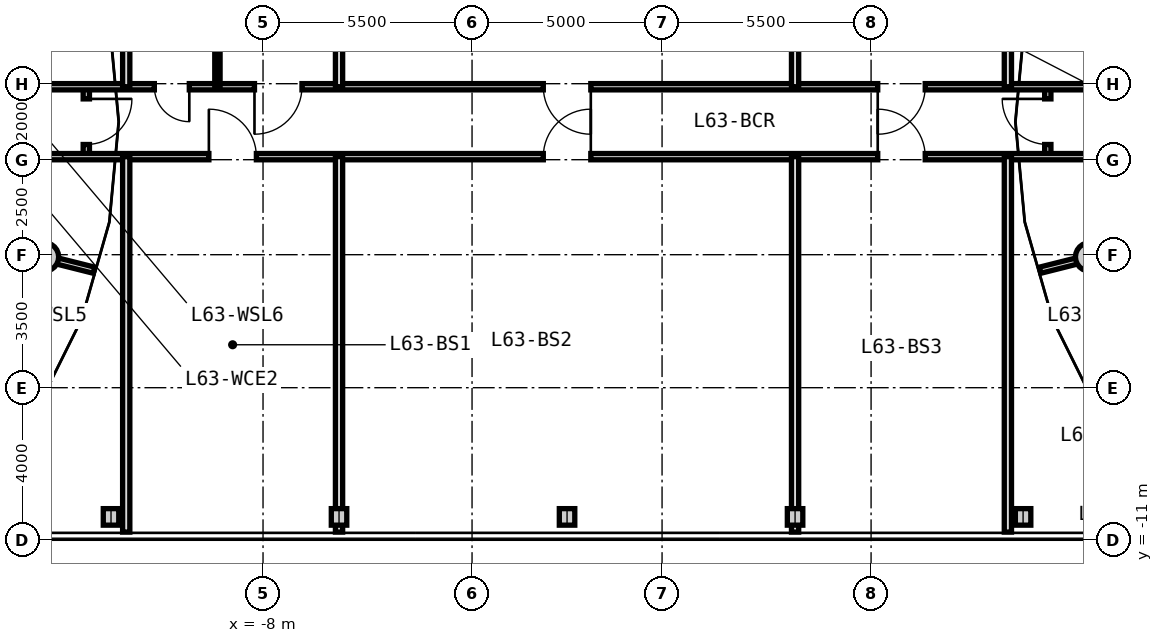
"""IFC4 building model, lengths in metres.
Left out: names, types, materials, properties, quantities, classifications, styles, units other than length and angle.
Written with IfcOpenShell. Run it as: python <this file> out.ifc"""

import sys

from ifc_helpers import new_model, si_unit, direction, frame, frame_2d, origin, origin_2d, place, context, subcontext, project, spatial, rectangle, circle, i_section, extrude, source, transform, mapped, element, fill, save


model = new_model("IFC4")
c1 = context("Model", 3, precision=1e-05, world=origin(), true_north=direction((0.0, 1.0)))
c2 = subcontext(c1, "Body", "Model", "MODEL_VIEW")
j1 = project(units=[si_unit("LENGTHUNIT", "METRE"), si_unit("PLANEANGLEUNIT", "RADIAN")], contexts=[c1])
p1 = place(None, origin())
s1 = spatial("IfcSite", under=j1, at=p1, CompositionType="ELEMENT")
p2 = place(p1, origin())
s2 = spatial("IfcBuilding", under=s1, at=p2, CompositionType="ELEMENT")
p3 = place(p2, frame((0.0, 0.0, 203.8)))
s3 = spatial("IfcBuildingStorey", under=s2, at=p3, CompositionType="ELEMENT", Elevation=203.8)
m1 = source(origin(), c2, "Body", "SweptSolid", [
    extrude(circle(Radius=0.375, at=origin_2d()), origin(), (0.0, 0.0, 1.0), 4.0),
])
for number, where, z_axis, x_axis in (
    (1, (-13.753, -3.559, 0.0), (0.0, 0.0, 1.0), (1.0, 0.0, 0.0)),
    (2, (13.753, -3.559, 0.0), (0.0, 0.0, 1.0), (1.0, 0.0, 0.0)),
):
    element("IfcColumn", number, at=place(p3, frame(where, z_axis=z_axis, x_axis=x_axis)), inside=s3, PredefinedType="COLUMN", context=c2, shape_type="MappedRepresentation", body=[
        mapped(m1, transform((0.0, 0.0, 0.0), x_axis=(1.0, 0.0, 0.0), y_axis=(0.0, 1.0, 0.0), z_axis=(0.0, 0.0, 1.0), scale=1.0)),
    ])
m2 = source(origin(), c2, "Body", "SweptSolid", [
    extrude(i_section(OverallWidth=0.407, OverallDepth=0.435, WebThickness=0.024, FlangeThickness=0.039, FilletRadius=0.015, at=origin_2d()), origin(), (0.0, 0.0, 1.0), 4.0),
])
for number, where, z_axis, x_axis in (
    (3, (-12.0, -10.4, 0.0), (0.0, 0.0, 1.0), (1.0, 0.0, 0.0)),
    (4, (-6.0, -10.4, 0.0), (0.0, 0.0, 1.0), (1.0, 0.0, 0.0)),
    (5, (0.0, -10.4, 0.0), (0.0, 0.0, 1.0), (1.0, 0.0, 0.0)),
    (6, (6.0, -10.4, 0.0), (0.0, 0.0, 1.0), (1.0, 0.0, 0.0)),
    (7, (12.0, -10.4, 0.0), (0.0, 0.0, 1.0), (1.0, 0.0, 0.0)),
):
    element("IfcColumn", number, at=place(p3, frame(where, z_axis=z_axis, x_axis=x_axis)), inside=s3, PredefinedType="COLUMN", context=c2, shape_type="MappedRepresentation", body=[
        mapped(m2, transform((0.0, 0.0, 0.0), x_axis=(1.0, 0.0, 0.0), y_axis=(0.0, 1.0, 0.0), z_axis=(0.0, 0.0, 1.0), scale=1.0)),
    ])
m3 = source(origin(), c2, "Body", "SweptSolid", [
    extrude(rectangle(XDim=6.157, YDim=0.165, at=frame_2d((3.079, 0.0))), origin(), (0.0, 0.0, 1.0), 3.295),
])
for number, where, z_axis, x_axis in (
    (8, (-18.42, -2.407, 0.0), (0.0, 0.0, 1.0), (0.97, -0.244, 0.0)),
    (9, (18.42, -2.407, 0.0), (0.0, 0.0, 1.0), (-0.97, -0.244, 0.0)),
):
    element("IfcWall", number, at=place(p3, frame(where, z_axis=z_axis, x_axis=x_axis)), inside=s3, PredefinedType="PARTITIONING", context=c2, shape_type="MappedRepresentation", body=[
        mapped(m3, transform((0.0, 0.0, 0.0), x_axis=(1.0, 0.0, 0.0), y_axis=(0.0, 1.0, 0.0), z_axis=(0.0, 0.0, 1.0), scale=1.0)),
    ])
m4 = source(origin(), c2, "Body", "SweptSolid", [
    extrude(rectangle(XDim=1.84, YDim=0.165, at=frame_2d((0.92, 0.0))), origin(), (0.0, 0.0, 1.0), 3.695),
])
p4 = place(p3, frame((-12.65, -0.92, 0.0), z_axis=(0.0, 0.0, 1.0), x_axis=(0.0, 1.0, 0.0)))
e10 = element("IfcWall", 10, at=p4, inside=s3, PredefinedType="PARTITIONING", context=c2, shape_type="MappedRepresentation", body=[
    mapped(m4, transform((0.0, 0.0, 0.0), x_axis=(1.0, 0.0, 0.0), y_axis=(0.0, 1.0, 0.0), z_axis=(0.0, 0.0, 1.0), scale=1.0)),
])
p5 = place(p4, frame((0.32, 0.0, 0.0)))
e11 = element("IfcOpeningElement", 11, at=p5, cuts=e10, PredefinedType="OPENING", context=c2, shape_type="SweptSolid", body=[
    extrude(rectangle(XDim=1.2, YDim=2.15, at=frame_2d((0.6, 1.075))), frame((0.0, 0.093, 0.0), z_axis=(0.0, -1.0, 0.0), x_axis=(1.0, 0.0, 0.0)), (0.0, 0.0, 1.0), 0.185),
])
p6 = place(p3, frame((12.65, -0.92, 0.0), z_axis=(0.0, 0.0, 1.0), x_axis=(0.0, 1.0, 0.0)))
e12 = element("IfcWall", 12, at=p6, inside=s3, PredefinedType="PARTITIONING", context=c2, shape_type="MappedRepresentation", body=[
    mapped(m4, transform((0.0, 0.0, 0.0), x_axis=(1.0, 0.0, 0.0), y_axis=(0.0, 1.0, 0.0), z_axis=(0.0, 0.0, 1.0), scale=1.0)),
])
p7 = place(p6, frame((0.32, 0.0, 0.0)))
e13 = element("IfcOpeningElement", 13, at=p7, cuts=e12, PredefinedType="OPENING", context=c2, shape_type="SweptSolid", body=[
    extrude(rectangle(XDim=1.2, YDim=2.15, at=frame_2d((0.6, 1.075))), frame((0.0, 0.093, 0.0), z_axis=(0.0, -1.0, 0.0), x_axis=(1.0, 0.0, 0.0)), (0.0, 0.0, 1.0), 0.185),
])
m5 = source(origin(), c2, "Body", "SweptSolid", [
    extrude(rectangle(XDim=37.0, YDim=0.165, at=frame_2d((18.5, 0.0))), origin(), (0.0, 0.0, 1.0), 3.695),
])
p8 = place(p3, frame((-18.5, -0.92, 0.0), z_axis=(0.0, 0.0, 1.0), x_axis=(1.0, 0.0, 0.0)))
e14 = element("IfcWall", 14, at=p8, inside=s3, PredefinedType="PARTITIONING", context=c2, shape_type="MappedRepresentation", body=[
    mapped(m5, transform((0.0, 0.0, 0.0), x_axis=(1.0, 0.0, 0.0), y_axis=(0.0, 1.0, 0.0), z_axis=(0.0, 0.0, 1.0), scale=1.0)),
])
p9 = place(p8, frame((2.662, 0.0, 0.0)))
e15 = element("IfcOpeningElement", 15, at=p9, cuts=e14, PredefinedType="OPENING", context=c2, shape_type="SweptSolid", body=[
    extrude(rectangle(XDim=0.95, YDim=2.1, at=frame_2d((0.475, 1.05))), frame((0.0, 0.093, 0.0), z_axis=(0.0, -1.0, 0.0), x_axis=(1.0, 0.0, 0.0)), (0.0, 0.0, 1.0), 0.185),
])
p10 = place(p8, frame((33.388, 0.0, 0.0)))
e16 = element("IfcOpeningElement", 16, at=p10, cuts=e14, PredefinedType="OPENING", context=c2, shape_type="SweptSolid", body=[
    extrude(rectangle(XDim=0.95, YDim=2.1, at=frame_2d((0.475, 1.05))), frame((0.0, 0.093, 0.0), z_axis=(0.0, -1.0, 0.0), x_axis=(1.0, 0.0, 0.0)), (0.0, 0.0, 1.0), 0.185),
])
p11 = place(p8, frame((9.075, 0.0, 0.0)))
e17 = element("IfcOpeningElement", 17, at=p11, cuts=e14, PredefinedType="OPENING", context=c2, shape_type="SweptSolid", body=[
    extrude(rectangle(XDim=1.25, YDim=2.2, at=frame_2d((0.625, 1.1))), frame((0.0, 0.093, 0.0), z_axis=(0.0, -1.0, 0.0), x_axis=(1.0, 0.0, 0.0)), (0.0, 0.0, 1.0), 0.185),
])
p12 = place(p8, frame((17.875, 0.0, 0.0)))
e18 = element("IfcOpeningElement", 18, at=p12, cuts=e14, PredefinedType="OPENING", context=c2, shape_type="SweptSolid", body=[
    extrude(rectangle(XDim=1.25, YDim=2.2, at=frame_2d((0.625, 1.1))), frame((0.0, 0.093, 0.0), z_axis=(0.0, -1.0, 0.0), x_axis=(1.0, 0.0, 0.0)), (0.0, 0.0, 1.0), 0.185),
])
p13 = place(p8, frame((26.675, 0.0, 0.0)))
e19 = element("IfcOpeningElement", 19, at=p13, cuts=e14, PredefinedType="OPENING", context=c2, shape_type="SweptSolid", body=[
    extrude(rectangle(XDim=1.25, YDim=2.2, at=frame_2d((0.625, 1.1))), frame((0.0, 0.093, 0.0), z_axis=(0.0, -1.0, 0.0), x_axis=(1.0, 0.0, 0.0)), (0.0, 0.0, 1.0), 0.185),
])
p14 = place(p3, frame((-18.5, 0.92, 0.0), z_axis=(0.0, 0.0, 1.0), x_axis=(1.0, 0.0, 0.0)))
e20 = element("IfcWall", 20, at=p14, inside=s3, PredefinedType="PARTITIONING", context=c2, shape_type="MappedRepresentation", body=[
    mapped(m5, transform((0.0, 0.0, 0.0), x_axis=(1.0, 0.0, 0.0), y_axis=(0.0, 1.0, 0.0), z_axis=(0.0, 0.0, 1.0), scale=1.0)),
])
p15 = place(p14, frame((2.662, 0.0, 0.0)))
e21 = element("IfcOpeningElement", 21, at=p15, cuts=e20, PredefinedType="OPENING", context=c2, shape_type="SweptSolid", body=[
    extrude(rectangle(XDim=0.95, YDim=2.1, at=frame_2d((0.475, 1.05))), frame((0.0, 0.093, 0.0), z_axis=(0.0, -1.0, 0.0), x_axis=(1.0, 0.0, 0.0)), (0.0, 0.0, 1.0), 0.185),
])
p16 = place(p14, frame((33.388, 0.0, 0.0)))
e22 = element("IfcOpeningElement", 22, at=p16, cuts=e20, PredefinedType="OPENING", context=c2, shape_type="SweptSolid", body=[
    extrude(rectangle(XDim=0.95, YDim=2.1, at=frame_2d((0.475, 1.05))), frame((0.0, 0.093, 0.0), z_axis=(0.0, -1.0, 0.0), x_axis=(1.0, 0.0, 0.0)), (0.0, 0.0, 1.0), 0.185),
])
p17 = place(p14, frame((7.64, 0.0, 0.0)))
e23 = element("IfcOpeningElement", 23, at=p17, cuts=e20, PredefinedType="OPENING", context=c2, shape_type="SweptSolid", body=[
    extrude(rectangle(XDim=0.92, YDim=2.1, at=frame_2d((0.46, 1.05))), frame((0.0, 0.093, 0.0), z_axis=(0.0, -1.0, 0.0), x_axis=(1.0, 0.0, 0.0)), (0.0, 0.0, 1.0), 0.185),
])
p18 = place(p14, frame((10.275, 0.0, 0.0)))
e24 = element("IfcOpeningElement", 24, at=p18, cuts=e20, PredefinedType="OPENING", context=c2, shape_type="SweptSolid", body=[
    extrude(rectangle(XDim=1.25, YDim=2.2, at=frame_2d((0.625, 1.1))), frame((0.0, 0.093, 0.0), z_axis=(0.0, -1.0, 0.0), x_axis=(1.0, 0.0, 0.0)), (0.0, 0.0, 1.0), 0.185),
])
p19 = place(p14, frame((17.875, 0.0, 0.0)))
e25 = element("IfcOpeningElement", 25, at=p19, cuts=e20, PredefinedType="OPENING", context=c2, shape_type="SweptSolid", body=[
    extrude(rectangle(XDim=1.25, YDim=2.2, at=frame_2d((0.625, 1.1))), frame((0.0, 0.093, 0.0), z_axis=(0.0, -1.0, 0.0), x_axis=(1.0, 0.0, 0.0)), (0.0, 0.0, 1.0), 0.185),
])
p20 = place(p14, frame((26.675, 0.0, 0.0)))
e26 = element("IfcOpeningElement", 26, at=p20, cuts=e20, PredefinedType="OPENING", context=c2, shape_type="SweptSolid", body=[
    extrude(rectangle(XDim=1.25, YDim=2.2, at=frame_2d((0.625, 1.1))), frame((0.0, 0.093, 0.0), z_axis=(0.0, -1.0, 0.0), x_axis=(1.0, 0.0, 0.0)), (0.0, 0.0, 1.0), 0.185),
])
m6 = source(origin(), c2, "Body", "SweptSolid", [
    extrude(rectangle(XDim=9.88, YDim=0.19, at=frame_2d((4.94, 0.0))), origin(), (0.0, 0.0, 1.0), 3.695),
])
for number, where, z_axis, x_axis in (
    (27, (-11.6, -10.8, 0.0), (0.0, 0.0, 1.0), (0.0, 1.0, 0.0)),
    (28, (-11.6, 0.92, 0.0), (0.0, 0.0, 1.0), (0.0, 1.0, 0.0)),
    (29, (11.6, -10.8, 0.0), (0.0, 0.0, 1.0), (0.0, 1.0, 0.0)),
    (30, (11.6, 0.92, 0.0), (0.0, 0.0, 1.0), (0.0, 1.0, 0.0)),
):
    element("IfcWall", number, at=place(p3, frame(where, z_axis=z_axis, x_axis=x_axis)), inside=s3, PredefinedType="PARTITIONING", context=c2, shape_type="MappedRepresentation", body=[
        mapped(m6, transform((0.0, 0.0, 0.0), x_axis=(1.0, 0.0, 0.0), y_axis=(0.0, 1.0, 0.0), z_axis=(0.0, 0.0, 1.0), scale=1.0)),
    ])
m7 = source(origin(), c2, "Body", "SweptSolid", [
    extrude(rectangle(XDim=9.88, YDim=0.19, at=frame_2d((4.94, 0.0))), origin(), (0.0, 0.0, 1.0), 2.995),
])
for number, where, z_axis, x_axis in (
    (31, (-6.0, -10.8, 0.0), (0.0, 0.0, 1.0), (0.0, 1.0, 0.0)),
    (32, (-6.0, 0.92, 0.0), (0.0, 0.0, 1.0), (0.0, 1.0, 0.0)),
):
    element("IfcWall", number, at=place(p3, frame(where, z_axis=z_axis, x_axis=x_axis)), inside=s3, PredefinedType="PARTITIONING", context=c2, shape_type="MappedRepresentation", body=[
        mapped(m7, transform((0.0, 0.0, 0.0), x_axis=(1.0, 0.0, 0.0), y_axis=(0.0, 1.0, 0.0), z_axis=(0.0, 0.0, 1.0), scale=1.0)),
    ])
m8 = source(origin(), c2, "Body", "SweptSolid", [
    extrude(rectangle(XDim=9.88, YDim=0.14, at=frame_2d((4.94, 0.0))), origin(), (0.0, 0.0, 1.0), 3.695),
])
p21 = place(p3, frame((-9.2, 0.92, 0.0), z_axis=(0.0, 0.0, 1.0), x_axis=(0.0, 1.0, 0.0)))
e33 = element("IfcWall", 33, at=p21, inside=s3, PredefinedType="PARTITIONING", context=c2, shape_type="MappedRepresentation", body=[
    mapped(m8, transform((0.0, 0.0, 0.0), x_axis=(1.0, 0.0, 0.0), y_axis=(0.0, 1.0, 0.0), z_axis=(0.0, 0.0, 1.0), scale=1.0)),
])
for number, where, z_axis, x_axis in (
    (34, (6.0, -10.8, 0.0), (0.0, 0.0, 1.0), (0.0, 1.0, 0.0)),
    (35, (6.0, 0.92, 0.0), (0.0, 0.0, 1.0), (0.0, 1.0, 0.0)),
):
    element("IfcWall", number, at=place(p3, frame(where, z_axis=z_axis, x_axis=x_axis)), inside=s3, PredefinedType="PARTITIONING", context=c2, shape_type="MappedRepresentation", body=[
        mapped(m7, transform((0.0, 0.0, 0.0), x_axis=(1.0, 0.0, 0.0), y_axis=(0.0, 1.0, 0.0), z_axis=(0.0, 0.0, 1.0), scale=1.0)),
    ])
m9 = source(origin(), c2, "Body", "SweptSolid", [
    extrude(rectangle(XDim=1.2, YDim=2.15, at=frame_2d((0.6, 1.075))), frame((0.0, 0.025, 0.0), z_axis=(0.0, -1.0, 0.0), x_axis=(1.0, 0.0, 0.0)), (0.0, 0.0, 1.0), 0.05),
])
p22 = place(p5, frame((1.2, 0.0, 0.0), z_axis=(0.0, 0.0, 1.0), x_axis=(-1.0, 0.0, 0.0)))
e36 = element("IfcDoor", 36, at=p22, inside=s3, OperationType="SINGLE_SWING_LEFT", PredefinedType="DOOR", context=c2, shape_type="MappedRepresentation", body=[
    mapped(m9, transform((0.0, 0.0, 0.0), x_axis=(1.0, 0.0, 0.0), y_axis=(0.0, 1.0, 0.0), z_axis=(0.0, 0.0, 1.0), scale=1.0)),
])
fill(e11, e36)
p23 = place(p7, origin())
e37 = element("IfcDoor", 37, at=p23, inside=s3, OperationType="SINGLE_SWING_RIGHT", PredefinedType="DOOR", context=c2, shape_type="MappedRepresentation", body=[
    mapped(m9, transform((0.0, 0.0, 0.0), x_axis=(1.0, 0.0, 0.0), y_axis=(0.0, 1.0, 0.0), z_axis=(0.0, 0.0, 1.0), scale=1.0)),
])
fill(e13, e37)
m10 = source(origin(), c2, "Body", "SweptSolid", [
    extrude(rectangle(XDim=1.25, YDim=2.2, at=frame_2d((0.625, 1.1))), frame((0.0, 0.025, 0.0), z_axis=(0.0, -1.0, 0.0), x_axis=(1.0, 0.0, 0.0)), (0.0, 0.0, 1.0), 0.05),
])
p24 = place(p11, origin())
e38 = element("IfcDoor", 38, at=p24, inside=s3, OperationType="SINGLE_SWING_LEFT", PredefinedType="DOOR", context=c2, shape_type="MappedRepresentation", body=[
    mapped(m10, transform((0.0, 0.0, 0.0), x_axis=(1.0, 0.0, 0.0), y_axis=(0.0, 1.0, 0.0), z_axis=(0.0, 0.0, 1.0), scale=1.0)),
])
fill(e17, e38)
m11 = source(origin(), c2, "Body", "SweptSolid", [
    extrude(rectangle(XDim=0.92, YDim=2.1, at=frame_2d((0.46, 1.05))), frame((0.0, 0.025, 0.0), z_axis=(0.0, -1.0, 0.0), x_axis=(1.0, 0.0, 0.0)), (0.0, 0.0, 1.0), 0.05),
])
p25 = place(p17, frame((0.92, 0.0, 0.0), z_axis=(0.0, 0.0, 1.0), x_axis=(-1.0, 0.0, 0.0)))
e39 = element("IfcDoor", 39, at=p25, inside=s3, OperationType="SINGLE_SWING_LEFT", PredefinedType="DOOR", context=c2, shape_type="MappedRepresentation", body=[
    mapped(m11, transform((0.0, 0.0, 0.0), x_axis=(1.0, 0.0, 0.0), y_axis=(0.0, 1.0, 0.0), z_axis=(0.0, 0.0, 1.0), scale=1.0)),
])
fill(e23, e39)
p26 = place(p18, frame((1.25, 0.0, 0.0), z_axis=(0.0, 0.0, 1.0), x_axis=(-1.0, 0.0, 0.0)))
e40 = element("IfcDoor", 40, at=p26, inside=s3, OperationType="SINGLE_SWING_RIGHT", PredefinedType="DOOR", context=c2, shape_type="MappedRepresentation", body=[
    mapped(m10, transform((0.0, 0.0, 0.0), x_axis=(1.0, 0.0, 0.0), y_axis=(0.0, 1.0, 0.0), z_axis=(0.0, 0.0, 1.0), scale=1.0)),
])
fill(e24, e40)
p27 = place(p12, origin())
e41 = element("IfcDoor", 41, at=p27, inside=s3, OperationType="SINGLE_SWING_RIGHT", PredefinedType="DOOR", context=c2, shape_type="MappedRepresentation", body=[
    mapped(m10, transform((0.0, 0.0, 0.0), x_axis=(1.0, 0.0, 0.0), y_axis=(0.0, 1.0, 0.0), z_axis=(0.0, 0.0, 1.0), scale=1.0)),
])
fill(e18, e41)
p28 = place(p19, frame((1.25, 0.0, 0.0), z_axis=(0.0, 0.0, 1.0), x_axis=(-1.0, 0.0, 0.0)))
e42 = element("IfcDoor", 42, at=p28, inside=s3, OperationType="SINGLE_SWING_LEFT", PredefinedType="DOOR", context=c2, shape_type="MappedRepresentation", body=[
    mapped(m10, transform((0.0, 0.0, 0.0), x_axis=(1.0, 0.0, 0.0), y_axis=(0.0, 1.0, 0.0), z_axis=(0.0, 0.0, 1.0), scale=1.0)),
])
fill(e25, e42)
p29 = place(p13, origin())
e43 = element("IfcDoor", 43, at=p29, inside=s3, OperationType="SINGLE_SWING_LEFT", PredefinedType="DOOR", context=c2, shape_type="MappedRepresentation", body=[
    mapped(m10, transform((0.0, 0.0, 0.0), x_axis=(1.0, 0.0, 0.0), y_axis=(0.0, 1.0, 0.0), z_axis=(0.0, 0.0, 1.0), scale=1.0)),
])
fill(e19, e43)
p30 = place(p20, frame((1.25, 0.0, 0.0), z_axis=(0.0, 0.0, 1.0), x_axis=(-1.0, 0.0, 0.0)))
e44 = element("IfcDoor", 44, at=p30, inside=s3, OperationType="SINGLE_SWING_RIGHT", PredefinedType="DOOR", context=c2, shape_type="MappedRepresentation", body=[
    mapped(m10, transform((0.0, 0.0, 0.0), x_axis=(1.0, 0.0, 0.0), y_axis=(0.0, 1.0, 0.0), z_axis=(0.0, 0.0, 1.0), scale=1.0)),
])
fill(e26, e44)
save(model, sys.argv[1])
